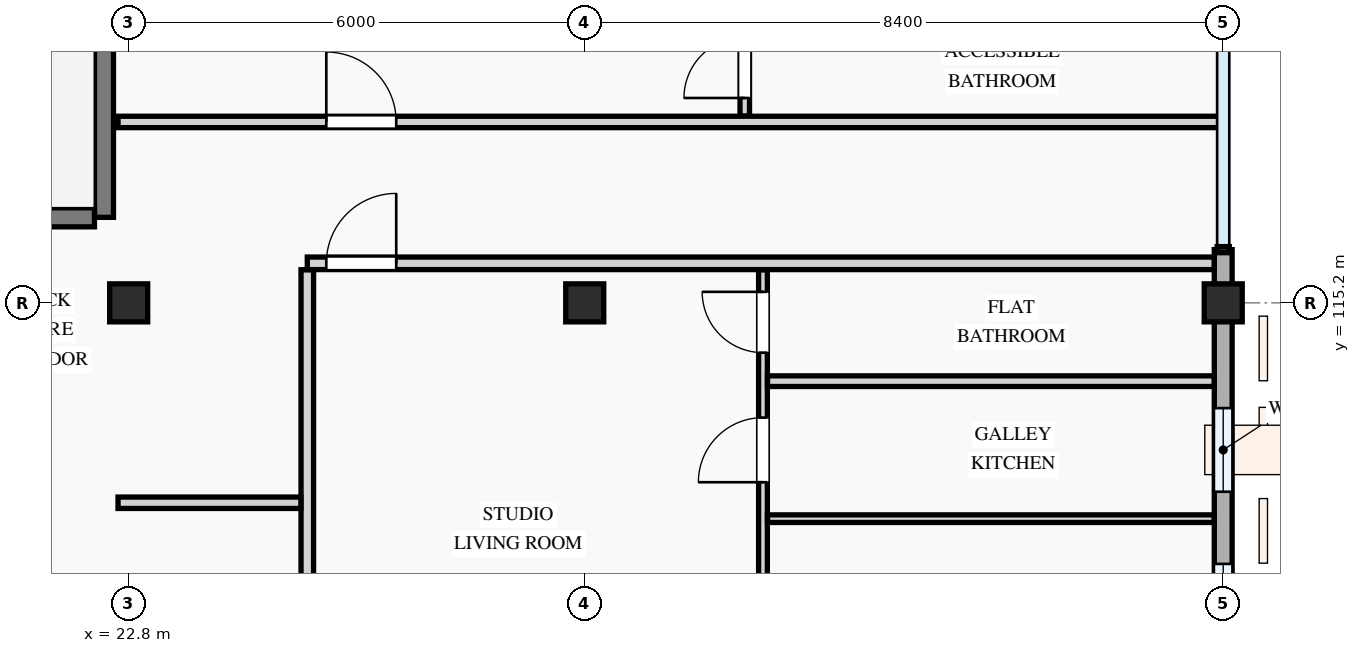
"""IFC4 building model, lengths in metres.
Left out: names, types, materials, properties, quantities, classifications, styles, units other than length and angle.
Written with IfcOpenShell. Run it as: python <this file> out.ifc"""

import sys

from ifc_helpers import new_model, si_unit, direction, frame, frame_2d, origin, origin_2d, place, context, subcontext, project, spatial, rectangle, extrude, element, fill, save


model = new_model("IFC4")
c1 = context("Model", 3, precision=1e-05, world=origin(), true_north=direction((0.0, 1.0)))
c2 = subcontext(c1, "Body", "Model", "MODEL_VIEW")
j1 = project(units=[si_unit("LENGTHUNIT", "METRE"), si_unit("PLANEANGLEUNIT", "RADIAN")], contexts=[c1])
p1 = place(None, origin())
s1 = spatial("IfcSite", under=j1, at=p1, CompositionType="ELEMENT")
p2 = place(p1, origin())
s2 = spatial("IfcBuilding", under=s1, at=p2, CompositionType="ELEMENT")
p3 = place(p2, frame((0.0, 0.0, 44.4)))
s3 = spatial("IfcBuildingStorey", under=s2, at=p3, CompositionType="ELEMENT", Elevation=44.4)
for number, where, z_axis, x_axis in (
    (1, (22.8, 115.2, 0.0), (0.0, 0.0, 1.0), (1.0, 0.0, 0.0)),
    (2, (28.8, 115.2, 0.0), (0.0, 0.0, 1.0), (1.0, 0.0, 0.0)),
    (3, (37.2, 115.2, 0.0), (0.0, 0.0, 1.0), (1.0, 0.0, 0.0)),
):
    element("IfcColumn", number, at=place(p3, frame(where, z_axis=z_axis, x_axis=x_axis)), inside=s3, PredefinedType="COLUMN", context=c2, shape_type="SweptSolid", body=[
        extrude(rectangle(XDim=0.5, YDim=0.5, at=origin_2d()), origin(), (0.0, 0.0, 1.0), 3.3),
    ])
p4 = place(p3, frame((37.2, 109.2, 0.0), z_axis=(0.0, 0.0, 1.0), x_axis=(0.0, 1.0, 0.0)))
e4 = element("IfcWall", 4, at=p4, inside=s3, PredefinedType="STANDARD", context=c2, shape_type="SweptSolid", body=[
    extrude(rectangle(XDim=6.0, YDim=0.235, at=frame_2d((3.0, 0.0))), origin(), (0.0, 0.0, 1.0), 2.575),
])
p5 = place(p4, frame((0.785, 0.0, 0.78)))
e5 = element("IfcOpeningElement", 5, at=p5, cuts=e4, PredefinedType="OPENING", context=c2, shape_type="SweptSolid", body=[
    extrude(rectangle(XDim=1.78, YDim=1.42, at=frame_2d((0.89, 0.71))), frame((0.0, 0.127, 0.0), z_axis=(0.0, -1.0, 0.0), x_axis=(1.0, 0.0, 0.0)), (0.0, 0.0, 1.0), 0.255),
])
p6 = place(p4, frame((3.515, 0.0, 0.78)))
e6 = element("IfcOpeningElement", 6, at=p6, cuts=e4, PredefinedType="OPENING", context=c2, shape_type="SweptSolid", body=[
    extrude(rectangle(XDim=1.1, YDim=1.3, at=frame_2d((0.55, 0.65))), frame((0.0, 0.127, 0.0), z_axis=(0.0, -1.0, 0.0), x_axis=(1.0, 0.0, 0.0)), (0.0, 0.0, 1.0), 0.255),
])
p7 = place(p3, frame((37.2, 115.2, 0.0), z_axis=(0.0, 0.0, 1.0), x_axis=(0.0, 1.0, 0.0)))
e7 = element("IfcWall", 7, at=p7, inside=s3, PredefinedType="STANDARD", context=c2, shape_type="SweptSolid", body=[
    extrude(rectangle(XDim=0.7, YDim=0.235, at=frame_2d((0.35, 0.0))), origin(), (0.0, 0.0, 1.0), 2.425),
])
p8 = place(p3, frame((22.475, 123.25, 0.0), z_axis=(0.0, 0.0, 1.0), x_axis=(0.0, -1.0, 0.0)))
e8 = element("IfcWall", 8, at=p8, inside=s3, PredefinedType="SHEAR", context=c2, shape_type="SweptSolid", body=[
    extrude(rectangle(XDim=6.925, YDim=0.25, at=frame_2d((3.462, 0.0))), origin(), (0.0, 0.0, 1.0), 3.0),
])
p9 = place(p3, frame((8.85, 116.325, 0.0), z_axis=(0.0, 0.0, 1.0), x_axis=(1.0, 0.0, 0.0)))
e9 = element("IfcWall", 9, at=p9, inside=s3, PredefinedType="SHEAR", context=c2, shape_type="SweptSolid", body=[
    extrude(rectangle(XDim=13.5, YDim=0.25, at=frame_2d((6.75, 0.0))), origin(), (0.0, 0.0, 1.0), 3.0),
])
p10 = place(p9, frame((6.2, 0.0, 0.0)))
e10 = element("IfcOpeningElement", 10, at=p10, cuts=e9, PredefinedType="OPENING", context=c2, shape_type="SweptSolid", body=[
    extrude(rectangle(XDim=1.1, YDim=2.15, at=frame_2d((0.55, 1.075))), frame((0.0, 0.135, 0.0), z_axis=(0.0, -1.0, 0.0), x_axis=(1.0, 0.0, 0.0)), (0.0, 0.0, 1.0), 0.27),
])
p11 = place(p3, frame((25.15, 109.32, 0.0), z_axis=(0.0, 0.0, 1.0), x_axis=(0.0, 1.0, 0.0)))
e11 = element("IfcWall", 11, at=p11, inside=s3, PredefinedType="PARTITIONING", context=c2, shape_type="SweptSolid", body=[
    extrude(rectangle(XDim=6.316, YDim=0.165, at=frame_2d((3.158, 0.0))), origin(), (0.0, 0.0, 1.0), 3.0),
])
p12 = place(p3, frame((22.66, 112.57, 0.0), z_axis=(0.0, 0.0, 1.0), x_axis=(1.0, 0.0, 0.0)))
e12 = element("IfcWall", 12, at=p12, inside=s3, PredefinedType="PARTITIONING", context=c2, shape_type="SweptSolid", body=[
    extrude(rectangle(XDim=2.406, YDim=0.15, at=frame_2d((1.203, 0.0))), origin(), (0.0, 0.0, 1.0), 3.0),
])
p13 = place(p3, frame((31.145, 109.26, 0.0), z_axis=(0.0, 0.0, 1.0), x_axis=(0.0, 1.0, 0.0)))
e13 = element("IfcWall", 13, at=p13, inside=s3, PredefinedType="PARTITIONING", context=c2, shape_type="SweptSolid", body=[
    extrude(rectangle(XDim=6.375, YDim=0.115, at=frame_2d((3.188, 0.0))), origin(), (0.0, 0.0, 1.0), 3.0),
])
p14 = place(p13, frame((1.125, 0.0, 0.0)))
e14 = element("IfcOpeningElement", 14, at=p14, cuts=e13, PredefinedType="OPENING", context=c2, shape_type="SweptSolid", body=[
    extrude(rectangle(XDim=0.85, YDim=2.1, at=frame_2d((0.425, 1.05))), frame((0.0, 0.067, 0.0), z_axis=(0.0, -1.0, 0.0), x_axis=(1.0, 0.0, 0.0)), (0.0, 0.0, 1.0), 0.135),
])
p15 = place(p13, frame((3.58, 0.0, 0.0)))
e15 = element("IfcOpeningElement", 15, at=p15, cuts=e13, PredefinedType="OPENING", context=c2, shape_type="SweptSolid", body=[
    extrude(rectangle(XDim=0.85, YDim=2.1, at=frame_2d((0.425, 1.05))), frame((0.0, 0.067, 0.0), z_axis=(0.0, -1.0, 0.0), x_axis=(1.0, 0.0, 0.0)), (0.0, 0.0, 1.0), 0.135),
])
p16 = place(p13, frame((5.285, 0.0, 0.0)))
e16 = element("IfcOpeningElement", 16, at=p16, cuts=e13, PredefinedType="OPENING", context=c2, shape_type="SweptSolid", body=[
    extrude(rectangle(XDim=0.8, YDim=2.1, at=frame_2d((0.4, 1.05))), frame((0.0, 0.067, 0.0), z_axis=(0.0, -1.0, 0.0), x_axis=(1.0, 0.0, 0.0)), (0.0, 0.0, 1.0), 0.135),
])
p17 = place(p3, frame((31.205, 112.361, 0.0), z_axis=(0.0, 0.0, 1.0), x_axis=(1.0, 0.0, 0.0)))
e17 = element("IfcWall", 17, at=p17, inside=s3, PredefinedType="PARTITIONING", context=c2, shape_type="SweptSolid", body=[
    extrude(rectangle(XDim=5.876, YDim=0.1, at=frame_2d((2.938, 0.0))), origin(), (0.0, 0.0, 1.0), 3.0),
])
p18 = place(p3, frame((31.205, 114.17, 0.0), z_axis=(0.0, 0.0, 1.0), x_axis=(1.0, 0.0, 0.0)))
e18 = element("IfcWall", 18, at=p18, inside=s3, PredefinedType="PARTITIONING", context=c2, shape_type="SweptSolid", body=[
    extrude(rectangle(XDim=5.876, YDim=0.14, at=frame_2d((2.938, 0.0))), origin(), (0.0, 0.0, 1.0), 3.0),
])
p19 = place(p3, frame((30.905, 117.657, 0.0), z_axis=(0.0, 0.0, 1.0), x_axis=(0.0, 1.0, 0.0)))
e19 = element("IfcWall", 19, at=p19, inside=s3, PredefinedType="PARTITIONING", context=c2, shape_type="SweptSolid", body=[
    extrude(rectangle(XDim=5.823, YDim=0.125, at=frame_2d((2.912, 0.0))), origin(), (0.0, 0.0, 1.0), 3.0),
])
p20 = place(p19, frame((0.238, 0.0, 0.0)))
e20 = element("IfcOpeningElement", 20, at=p20, cuts=e19, PredefinedType="OPENING", context=c2, shape_type="SweptSolid", body=[
    extrude(rectangle(XDim=0.8, YDim=2.1, at=frame_2d((0.4, 1.05))), frame((0.0, 0.073, 0.0), z_axis=(0.0, -1.0, 0.0), x_axis=(1.0, 0.0, 0.0)), (0.0, 0.0, 1.0), 0.145),
])
p21 = place(p19, frame((1.763, 0.0, 0.0)))
e21 = element("IfcOpeningElement", 21, at=p21, cuts=e19, PredefinedType="OPENING", context=c2, shape_type="SweptSolid", body=[
    extrude(rectangle(XDim=0.85, YDim=2.1, at=frame_2d((0.425, 1.05))), frame((0.0, 0.073, 0.0), z_axis=(0.0, -1.0, 0.0), x_axis=(1.0, 0.0, 0.0)), (0.0, 0.0, 1.0), 0.145),
])
p22 = place(p19, frame((4.028, 0.0, 0.0)))
e22 = element("IfcOpeningElement", 22, at=p22, cuts=e19, PredefinedType="OPENING", context=c2, shape_type="SweptSolid", body=[
    extrude(rectangle(XDim=0.85, YDim=2.1, at=frame_2d((0.425, 1.05))), frame((0.0, 0.073, 0.0), z_axis=(0.0, -1.0, 0.0), x_axis=(1.0, 0.0, 0.0)), (0.0, 0.0, 1.0), 0.145),
])
p23 = place(p3, frame((25.15, 115.72, 0.0), z_axis=(0.0, 0.0, 1.0), x_axis=(1.0, 0.0, 0.0)))
e23 = element("IfcWall", 23, at=p23, inside=s3, PredefinedType="PARTITIONING", context=c2, shape_type="SweptSolid", body=[
    extrude(rectangle(XDim=11.931, YDim=0.165, at=frame_2d((5.965, 0.0))), origin(), (0.0, 0.0, 1.0), 3.0),
])
p24 = place(p23, frame((0.25, 0.0, 0.0)))
e24 = element("IfcOpeningElement", 24, at=p24, cuts=e23, PredefinedType="OPENING", context=c2, shape_type="SweptSolid", body=[
    extrude(rectangle(XDim=0.92, YDim=2.1, at=frame_2d((0.46, 1.05))), frame((0.0, 0.093, 0.0), z_axis=(0.0, -1.0, 0.0), x_axis=(1.0, 0.0, 0.0)), (0.0, 0.0, 1.0), 0.185),
])
p25 = place(p3, frame((22.66, 117.58, 0.0), z_axis=(0.0, 0.0, 1.0), x_axis=(1.0, 0.0, 0.0)))
e25 = element("IfcWall", 25, at=p25, inside=s3, PredefinedType="PARTITIONING", context=c2, shape_type="SweptSolid", body=[
    extrude(rectangle(XDim=14.48, YDim=0.15, at=frame_2d((7.24, 0.0))), origin(), (0.0, 0.0, 1.0), 3.0),
])
p26 = place(p25, frame((2.74, 0.0, 0.0)))
e26 = element("IfcOpeningElement", 26, at=p26, cuts=e25, PredefinedType="OPENING", context=c2, shape_type="SweptSolid", body=[
    extrude(rectangle(XDim=0.92, YDim=2.1, at=frame_2d((0.46, 1.05))), frame((0.0, 0.085, 0.0), z_axis=(0.0, -1.0, 0.0), x_axis=(1.0, 0.0, 0.0)), (0.0, 0.0, 1.0), 0.17),
])
p27 = place(p5, origin())
e27 = element("IfcWindow", 27, at=p27, inside=s3, PartitioningType="DOUBLE_PANEL_VERTICAL", PredefinedType="WINDOW", context=c2, shape_type="SweptSolid", body=[
    extrude(rectangle(XDim=1.78, YDim=1.42, at=frame_2d((0.89, 0.71))), frame((0.0, 0.03, 0.0), z_axis=(0.0, -1.0, 0.0), x_axis=(1.0, 0.0, 0.0)), (0.0, 0.0, 1.0), 0.06),
])
fill(e5, e27)
p28 = place(p6, origin())
e28 = element("IfcWindow", 28, at=p28, inside=s3, PartitioningType="SINGLE_PANEL", PredefinedType="WINDOW", context=c2, shape_type="SweptSolid", body=[
    extrude(rectangle(XDim=1.1, YDim=1.3, at=frame_2d((0.55, 0.65))), frame((0.0, 0.03, 0.0), z_axis=(0.0, -1.0, 0.0), x_axis=(1.0, 0.0, 0.0)), (0.0, 0.0, 1.0), 0.06),
])
fill(e6, e28)
p29 = place(p15, origin())
e29 = element("IfcDoor", 29, at=p29, inside=s3, OperationType="SINGLE_SWING_LEFT", PredefinedType="DOOR", context=c2, shape_type="SweptSolid", body=[
    extrude(rectangle(XDim=0.85, YDim=2.1, at=frame_2d((0.425, 1.05))), frame((0.0, 0.025, 0.0), z_axis=(0.0, -1.0, 0.0), x_axis=(1.0, 0.0, 0.0)), (0.0, 0.0, 1.0), 0.05),
])
fill(e15, e29)
p30 = place(p16, origin())
e30 = element("IfcDoor", 30, at=p30, inside=s3, OperationType="SINGLE_SWING_RIGHT", PredefinedType="DOOR", context=c2, shape_type="SweptSolid", body=[
    extrude(rectangle(XDim=0.8, YDim=2.1, at=frame_2d((0.4, 1.05))), frame((0.0, 0.025, 0.0), z_axis=(0.0, -1.0, 0.0), x_axis=(1.0, 0.0, 0.0)), (0.0, 0.0, 1.0), 0.05),
])
fill(e16, e30)
p31 = place(p20, origin())
e31 = element("IfcDoor", 31, at=p31, inside=s3, OperationType="SINGLE_SWING_LEFT", PredefinedType="DOOR", context=c2, shape_type="SweptSolid", body=[
    extrude(rectangle(XDim=0.8, YDim=2.1, at=frame_2d((0.4, 1.05))), frame((0.0, 0.025, 0.0), z_axis=(0.0, -1.0, 0.0), x_axis=(1.0, 0.0, 0.0)), (0.0, 0.0, 1.0), 0.05),
])
fill(e20, e31)
p32 = place(p24, origin())
e32 = element("IfcDoor", 32, at=p32, inside=s3, OperationType="SINGLE_SWING_RIGHT", PredefinedType="DOOR", context=c2, shape_type="SweptSolid", body=[
    extrude(rectangle(XDim=0.92, YDim=2.1, at=frame_2d((0.46, 1.05))), frame((0.0, 0.025, 0.0), z_axis=(0.0, -1.0, 0.0), x_axis=(1.0, 0.0, 0.0)), (0.0, 0.0, 1.0), 0.05),
])
fill(e24, e32)
p33 = place(p26, origin())
e33 = element("IfcDoor", 33, at=p33, inside=s3, OperationType="SINGLE_SWING_LEFT", PredefinedType="DOOR", context=c2, shape_type="SweptSolid", body=[
    extrude(rectangle(XDim=0.92, YDim=2.1, at=frame_2d((0.46, 1.05))), frame((0.0, 0.025, 0.0), z_axis=(0.0, -1.0, 0.0), x_axis=(1.0, 0.0, 0.0)), (0.0, 0.0, 1.0), 0.05),
])
fill(e26, e33)
save(model, sys.argv[1])
